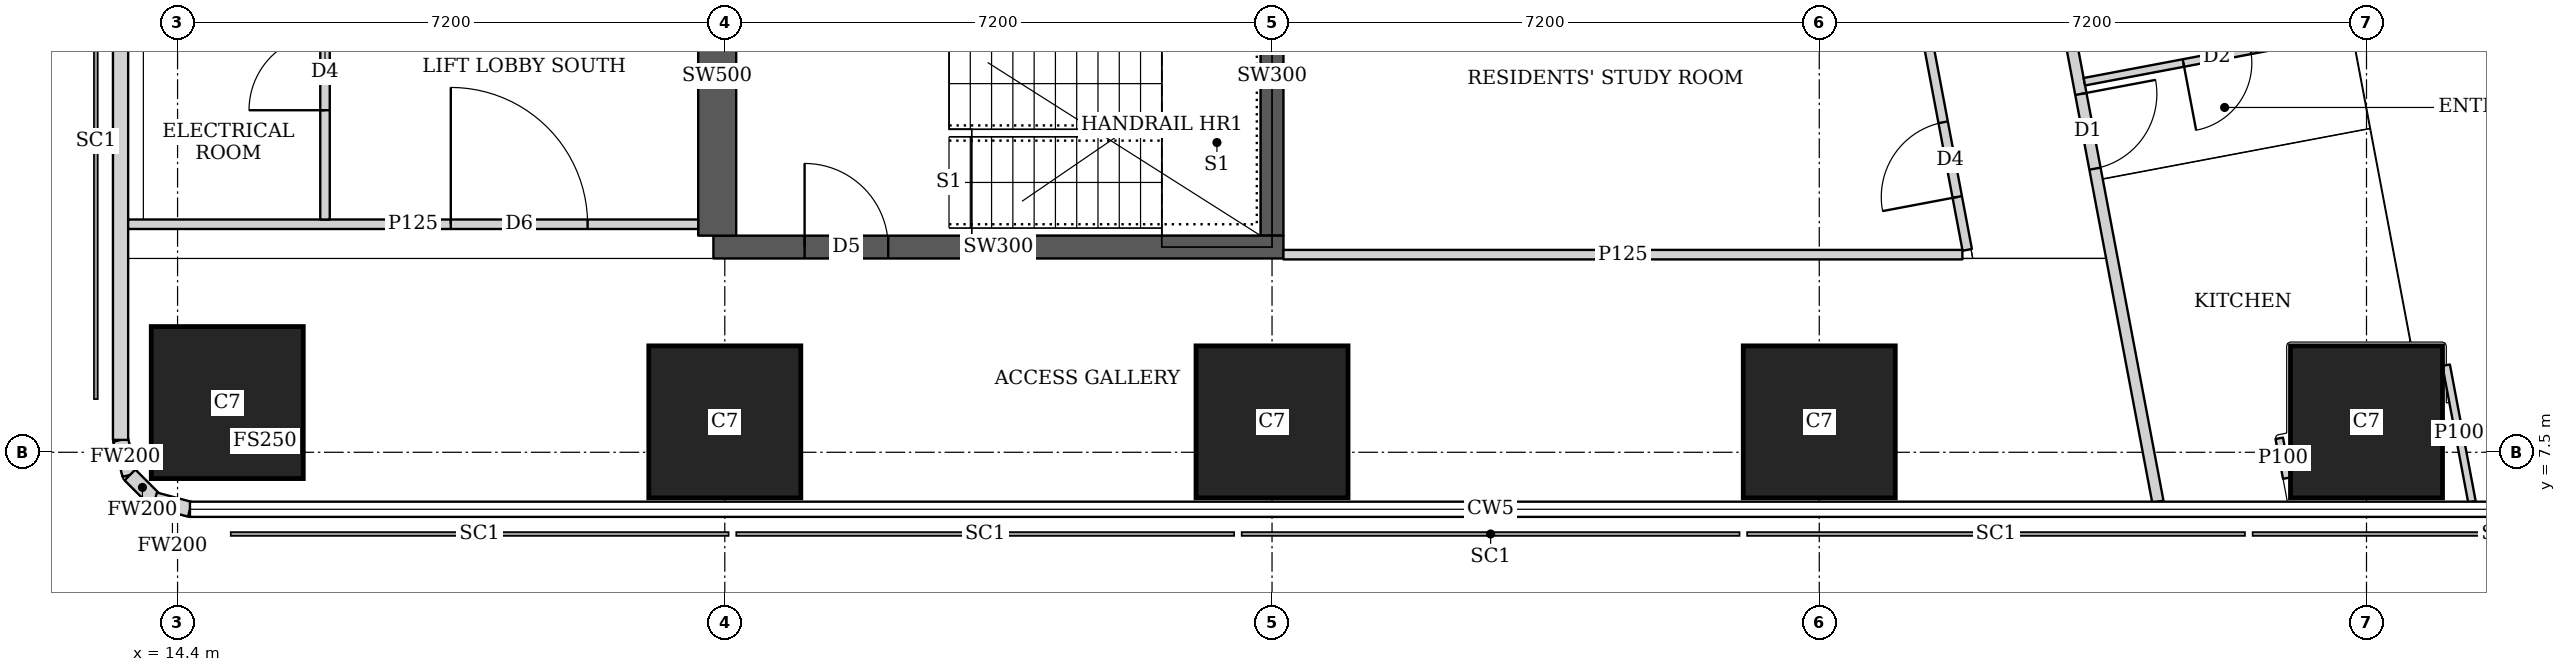
"""IFC4 building model, lengths in metres.
Left out: names, types, materials, properties, quantities, classifications, styles, units other than length and angle.
Written with IfcOpenShell. Run it as: python <this file> out.ifc"""

import sys

from ifc_helpers import new_model, si_unit, direction, frame, frame_2d, origin, origin_2d, place, context, subcontext, project, spatial, rectangle, extrude, element, fill, save


model = new_model("IFC4")
c1 = context("Model", 3, precision=1e-05, world=origin(), true_north=direction((0.0, 1.0)))
c2 = subcontext(c1, "Body", "Model", "MODEL_VIEW")
j1 = project(units=[si_unit("LENGTHUNIT", "METRE"), si_unit("PLANEANGLEUNIT", "RADIAN")], contexts=[c1])
p1 = place(None, origin())
s1 = spatial("IfcSite", under=j1, at=p1, CompositionType="ELEMENT")
p2 = place(p1, origin())
s2 = spatial("IfcBuilding", under=s1, at=p2, CompositionType="ELEMENT")
p3 = place(p2, frame((0.0, 0.0, 277.85)))
s3 = spatial("IfcBuildingStorey", under=s2, at=p3, CompositionType="ELEMENT", Elevation=277.85)
for number, where, z_axis, x_axis in (
    (1, (15.054, 8.154, 0.0), (0.0, 0.0, 1.0), (1.0, 0.0, 0.0)),
    (2, (21.6, 7.9, 0.0), (0.0, 0.0, 1.0), (1.0, 0.0, 0.0)),
    (3, (28.8, 7.9, 0.0), (0.0, 0.0, 1.0), (1.0, 0.0, 0.0)),
    (4, (36.0, 7.9, 0.0), (0.0, 0.0, 1.0), (1.0, 0.0, 0.0)),
    (5, (43.2, 7.9, 0.0), (0.0, 0.0, 1.0), (1.0, 0.0, 0.0)),
):
    element("IfcColumn", number, at=place(p3, frame(where, z_axis=z_axis, x_axis=x_axis)), inside=s3, PredefinedType="COLUMN", context=c2, shape_type="SweptSolid", body=[
        extrude(rectangle(XDim=2.0, YDim=2.0, at=origin_2d()), origin(), (0.0, 0.0, 1.0), 3.75),
    ])
p4 = place(p3, frame((21.45, 10.2, 0.0), z_axis=(0.0, 0.0, 1.0), x_axis=(1.0, 0.0, 0.0)))
e6 = element("IfcWall", 6, at=p4, inside=s3, PredefinedType="SHEAR", context=c2, shape_type="SweptSolid", body=[
    extrude(rectangle(XDim=7.5, YDim=0.3, at=frame_2d((3.75, 0.0))), origin(), (0.0, 0.0, 1.0), 3.75),
])
p5 = place(p4, frame((1.2, 0.0, 0.0)))
e7 = element("IfcOpeningElement", 7, at=p5, cuts=e6, PredefinedType="OPENING", context=c2, shape_type="SweptSolid", body=[
    extrude(rectangle(XDim=1.1, YDim=2.1, at=frame_2d((0.55, 1.05))), frame((0.0, 0.16, 0.0), z_axis=(0.0, -1.0, 0.0), x_axis=(1.0, 0.0, 0.0)), (0.0, 0.0, 1.0), 0.32),
])
p6 = place(p3, frame((21.5, 10.35, 0.0), z_axis=(0.0, 0.0, 1.0), x_axis=(0.0, 1.0, 0.0)))
e8 = element("IfcWall", 8, at=p6, inside=s3, PredefinedType="SHEAR", context=c2, shape_type="SweptSolid", body=[
    extrude(rectangle(XDim=4.2, YDim=0.5, at=frame_2d((2.1, 0.0))), origin(), (0.0, 0.0, 1.0), 3.75),
])
p7 = place(p3, frame((28.8, 10.35, 0.0), z_axis=(0.0, 0.0, 1.0), x_axis=(0.0, 1.0, 0.0)))
e9 = element("IfcWall", 9, at=p7, inside=s3, PredefinedType="SHEAR", context=c2, shape_type="SweptSolid", body=[
    extrude(rectangle(XDim=4.2, YDim=0.3, at=frame_2d((2.1, 0.0))), origin(), (0.0, 0.0, 1.0), 3.75),
])
p8 = place(p3, frame((49.684, 7.832, 0.0), z_axis=(0.0, 0.0, 1.0), x_axis=(-0.185616669694, 0.982622232565, 0.0)))
e10 = element("IfcWall", 10, at=p8, inside=s3, PredefinedType="SOLIDWALL", context=c2, shape_type="SweptSolid", body=[
    extrude(rectangle(XDim=36.0, YDim=0.2, at=frame_2d((18.0, 0.0))), origin(), (0.0, 0.0, 1.0), 3.5),
])
p9 = place(p8, frame((2.518, 0.0, 0.9)))
e11 = element("IfcOpeningElement", 11, at=p9, cuts=e10, PredefinedType="OPENING", context=c2, shape_type="SweptSolid", body=[
    extrude(rectangle(XDim=2.4, YDim=1.5, at=frame_2d((1.2, 0.75))), frame((0.0, 0.11, 0.0), z_axis=(0.0, -1.0, 0.0), x_axis=(1.0, 0.0, 0.0)), (0.0, 0.0, 1.0), 0.22),
])
p10 = place(p8, frame((8.444, 0.0, 0.9)))
e12 = element("IfcOpeningElement", 12, at=p10, cuts=e10, PredefinedType="OPENING", context=c2, shape_type="SweptSolid", body=[
    extrude(rectangle(XDim=1.8, YDim=1.5, at=frame_2d((0.9, 0.75))), frame((0.0, 0.11, 0.0), z_axis=(0.0, -1.0, 0.0), x_axis=(1.0, 0.0, 0.0)), (0.0, 0.0, 1.0), 0.22),
])
p11 = place(p8, frame((12.261, 0.0, 0.9)))
e13 = element("IfcOpeningElement", 13, at=p11, cuts=e10, PredefinedType="OPENING", context=c2, shape_type="SweptSolid", body=[
    extrude(rectangle(XDim=1.8, YDim=1.5, at=frame_2d((0.9, 0.75))), frame((0.0, 0.11, 0.0), z_axis=(0.0, -1.0, 0.0), x_axis=(1.0, 0.0, 0.0)), (0.0, 0.0, 1.0), 0.22),
])
p12 = place(p8, frame((16.078, 0.0, 0.9)))
e14 = element("IfcOpeningElement", 14, at=p12, cuts=e10, PredefinedType="OPENING", context=c2, shape_type="SweptSolid", body=[
    extrude(rectangle(XDim=1.8, YDim=1.5, at=frame_2d((0.9, 0.75))), frame((0.0, 0.11, 0.0), z_axis=(0.0, -1.0, 0.0), x_axis=(1.0, 0.0, 0.0)), (0.0, 0.0, 1.0), 0.22),
])
p13 = place(p8, frame((19.894, 0.0, 0.9)))
e15 = element("IfcOpeningElement", 15, at=p13, cuts=e10, PredefinedType="OPENING", context=c2, shape_type="SweptSolid", body=[
    extrude(rectangle(XDim=1.8, YDim=1.5, at=frame_2d((0.9, 0.75))), frame((0.0, 0.11, 0.0), z_axis=(0.0, -1.0, 0.0), x_axis=(1.0, 0.0, 0.0)), (0.0, 0.0, 1.0), 0.22),
])
p14 = place(p8, frame((23.71, 0.0, 0.9)))
e16 = element("IfcOpeningElement", 16, at=p14, cuts=e10, PredefinedType="OPENING", context=c2, shape_type="SweptSolid", body=[
    extrude(rectangle(XDim=1.8, YDim=1.5, at=frame_2d((0.9, 0.75))), frame((0.0, 0.11, 0.0), z_axis=(0.0, -1.0, 0.0), x_axis=(1.0, 0.0, 0.0)), (0.0, 0.0, 1.0), 0.22),
])
p15 = place(p8, frame((27.526, 0.0, 0.9)))
e17 = element("IfcOpeningElement", 17, at=p15, cuts=e10, PredefinedType="OPENING", context=c2, shape_type="SweptSolid", body=[
    extrude(rectangle(XDim=1.8, YDim=1.5, at=frame_2d((0.9, 0.75))), frame((0.0, 0.11, 0.0), z_axis=(0.0, -1.0, 0.0), x_axis=(1.0, 0.0, 0.0)), (0.0, 0.0, 1.0), 0.22),
])
p16 = place(p8, frame((32.046, 0.0, 0.9)))
e18 = element("IfcOpeningElement", 18, at=p16, cuts=e10, PredefinedType="OPENING", context=c2, shape_type="SweptSolid", body=[
    extrude(rectangle(XDim=1.8, YDim=1.5, at=frame_2d((0.9, 0.75))), frame((0.0, 0.11, 0.0), z_axis=(0.0, -1.0, 0.0), x_axis=(1.0, 0.0, 0.0)), (0.0, 0.0, 1.0), 0.22),
])
p17 = place(p3, frame((13.65, 43.037, 0.0), z_axis=(0.0, 0.0, 1.0), x_axis=(0.0, -1.0, 0.0)))
e19 = element("IfcWall", 19, at=p17, inside=s3, PredefinedType="SOLIDWALL", context=c2, shape_type="SweptSolid", body=[
    extrude(rectangle(XDim=35.374, YDim=0.2, at=frame_2d((17.687, 0.0))), origin(), (0.0, 0.0, 1.0), 3.5),
])
p18 = place(p17, frame((1.959, 0.0, 0.9)))
e20 = element("IfcOpeningElement", 20, at=p18, cuts=e19, PredefinedType="OPENING", context=c2, shape_type="SweptSolid", body=[
    extrude(rectangle(XDim=1.8, YDim=1.5, at=frame_2d((0.9, 0.75))), frame((0.0, 0.11, 0.0), z_axis=(0.0, -1.0, 0.0), x_axis=(1.0, 0.0, 0.0)), (0.0, 0.0, 1.0), 0.22),
])
p19 = place(p3, frame((13.65, 7.663, 0.0), z_axis=(0.0, 0.0, 1.0), x_axis=(0.259698463175, -0.965689757751, 0.0)))
e21 = element("IfcWall", 21, at=p19, inside=s3, PredefinedType="SOLIDWALL", context=c2, shape_type="SweptSolid", body=[
    extrude(rectangle(XDim=0.478, YDim=0.2, at=frame_2d((0.239, 0.0))), origin(), (0.0, 0.0, 1.0), 3.5),
])
p20 = place(p3, frame((13.774, 7.202, 0.0), z_axis=(0.0, 0.0, 1.0), x_axis=(0.707369890659, -0.706843573776, 0.0)))
e22 = element("IfcWall", 22, at=p20, inside=s3, PredefinedType="SOLIDWALL", context=c2, shape_type="SweptSolid", body=[
    extrude(rectangle(XDim=0.464, YDim=0.2, at=frame_2d((0.232, 0.0))), origin(), (0.0, 0.0, 1.0), 3.5),
])
p21 = place(p3, frame((14.102, 6.874, 0.0), z_axis=(0.0, 0.0, 1.0), x_axis=(0.965655254015, -0.259826731483, 0.0)))
e23 = element("IfcWall", 23, at=p21, inside=s3, PredefinedType="SOLIDWALL", context=c2, shape_type="SweptSolid", body=[
    extrude(rectangle(XDim=0.477, YDim=0.2, at=frame_2d((0.239, 0.0))), origin(), (0.0, 0.0, 1.0), 3.5),
])
p22 = place(p3, frame((33.781, 42.186, 0.0), z_axis=(0.0, 0.0, 1.0), x_axis=(0.185593518645, -0.9826266055, 0.0)))
e24 = element("IfcWall", 24, at=p22, inside=s3, PredefinedType="SOLIDWALL", context=c2, shape_type="SweptSolid", body=[
    extrude(rectangle(XDim=35.961, YDim=0.15, at=frame_2d((17.98, 0.0))), origin(), (0.0, 0.0, 1.0), 2.5),
])
p23 = place(p22, frame((11.76, 0.0, 0.0)))
e25 = element("IfcOpeningElement", 25, at=p23, cuts=e24, PredefinedType="OPENING", context=c2, shape_type="SweptSolid", body=[
    extrude(rectangle(XDim=1.0, YDim=2.1, at=frame_2d((0.5, 1.05))), frame((0.0, 0.085, 0.0), z_axis=(0.0, -1.0, 0.0), x_axis=(1.0, 0.0, 0.0)), (0.0, 0.0, 1.0), 0.17),
])
p24 = place(p22, frame((15.576, 0.0, 0.0)))
e26 = element("IfcOpeningElement", 26, at=p24, cuts=e24, PredefinedType="OPENING", context=c2, shape_type="SweptSolid", body=[
    extrude(rectangle(XDim=1.0, YDim=2.1, at=frame_2d((0.5, 1.05))), frame((0.0, 0.085, 0.0), z_axis=(0.0, -1.0, 0.0), x_axis=(1.0, 0.0, 0.0)), (0.0, 0.0, 1.0), 0.17),
])
p25 = place(p22, frame((30.502, 0.0, 0.0)))
e27 = element("IfcOpeningElement", 27, at=p25, cuts=e24, PredefinedType="OPENING", context=c2, shape_type="SweptSolid", body=[
    extrude(rectangle(XDim=1.0, YDim=2.1, at=frame_2d((0.5, 1.05))), frame((0.0, 0.085, 0.0), z_axis=(0.0, -1.0, 0.0), x_axis=(1.0, 0.0, 0.0)), (0.0, 0.0, 1.0), 0.17),
])
p26 = place(p3, frame((44.248, 8.646, 0.0), z_axis=(0.0, 0.0, 1.0), x_axis=(0.185417594585, -0.982659816833, 0.0)))
e28 = element("IfcWall", 28, at=p26, inside=s3, PredefinedType="PARTITIONING", context=c2, shape_type="SweptSolid", body=[
    extrude(rectangle(XDim=1.828, YDim=0.1, at=frame_2d((0.914, 0.0))), origin(), (0.0, 0.0, 1.0), 2.05),
])
p27 = place(p3, frame((42.151, 7.16, 0.0), z_axis=(0.0, 0.0, 1.0), x_axis=(-0.185366164644, 0.982669519729, 0.0)))
e29 = element("IfcWall", 29, at=p27, inside=s3, PredefinedType="PARTITIONING", context=c2, shape_type="SweptSolid", body=[
    extrude(rectangle(XDim=0.533, YDim=0.1, at=frame_2d((0.267, 0.0))), origin(), (0.0, 0.0, 1.0), 2.5),
])
p28 = place(p3, frame((42.952, 13.03, 0.0), z_axis=(0.0, 0.0, 1.0), x_axis=(-0.982585626838, -0.185810349366, 0.0)))
e30 = element("IfcWall", 30, at=p28, inside=s3, PredefinedType="PARTITIONING", context=c2, shape_type="SweptSolid", body=[
    extrude(rectangle(XDim=3.525, YDim=0.1, at=frame_2d((1.763, 0.0))), origin(), (0.0, 0.0, 1.0), 3.5),
])
p29 = place(p28, frame((1.299, 0.0, 0.0)))
e31 = element("IfcOpeningElement", 31, at=p29, cuts=e30, PredefinedType="OPENING", context=c2, shape_type="SweptSolid", body=[
    extrude(rectangle(XDim=0.9, YDim=2.1, at=frame_2d((0.45, 1.05))), frame((0.0, 0.06, 0.0), z_axis=(0.0, -1.0, 0.0), x_axis=(1.0, 0.0, 0.0)), (0.0, 0.0, 1.0), 0.12),
])
p30 = place(p3, frame((13.75, 10.5, 0.0), z_axis=(0.0, 0.0, 1.0), x_axis=(1.0, 0.0, 0.0)))
e32 = element("IfcWall", 32, at=p30, inside=s3, PredefinedType="PARTITIONING", context=c2, shape_type="SweptSolid", body=[
    extrude(rectangle(XDim=7.5, YDim=0.125, at=frame_2d((3.75, 0.0))), origin(), (0.0, 0.0, 1.0), 3.5),
])
p31 = place(p30, frame((4.245, 0.0, 0.0)))
e33 = element("IfcOpeningElement", 33, at=p31, cuts=e32, PredefinedType="OPENING", context=c2, shape_type="SweptSolid", body=[
    extrude(rectangle(XDim=1.8, YDim=2.1, at=frame_2d((0.9, 1.05))), frame((0.0, 0.073, 0.0), z_axis=(0.0, -1.0, 0.0), x_axis=(1.0, 0.0, 0.0)), (0.0, 0.0, 1.0), 0.145),
])
p32 = place(p3, frame((16.34, 10.562, 0.0), z_axis=(0.0, 0.0, 1.0), x_axis=(0.0, 1.0, 0.0)))
e34 = element("IfcWall", 34, at=p32, inside=s3, PredefinedType="PARTITIONING", context=c2, shape_type="SweptSolid", body=[
    extrude(rectangle(XDim=3.988, YDim=0.125, at=frame_2d((1.994, 0.0))), origin(), (0.0, 0.0, 1.0), 3.5),
])
p33 = place(p32, frame((1.438, 0.0, 0.0)))
e35 = element("IfcOpeningElement", 35, at=p33, cuts=e34, PredefinedType="OPENING", context=c2, shape_type="SweptSolid", body=[
    extrude(rectangle(XDim=1.0, YDim=2.1, at=frame_2d((0.5, 1.05))), frame((0.0, 0.073, 0.0), z_axis=(0.0, -1.0, 0.0), x_axis=(1.0, 0.0, 0.0)), (0.0, 0.0, 1.0), 0.145),
])
p34 = place(p3, frame((28.95, 10.1, 0.0), z_axis=(0.0, 0.0, 1.0), x_axis=(1.0, 0.0, 0.0)))
e36 = element("IfcWall", 36, at=p34, inside=s3, PredefinedType="PARTITIONING", context=c2, shape_type="SweptSolid", body=[
    extrude(rectangle(XDim=8.933, YDim=0.125, at=frame_2d((4.467, 0.0))), origin(), (0.0, 0.0, 1.0), 3.5),
])
p35 = place(p3, frame((37.947, 10.163, 0.0), z_axis=(0.0, 0.0, 1.0), x_axis=(-0.185572770922, 0.982630523998, 0.0)))
e37 = element("IfcWall", 37, at=p35, inside=s3, PredefinedType="PARTITIONING", context=c2, shape_type="SweptSolid", body=[
    extrude(rectangle(XDim=25.111, YDim=0.125, at=frame_2d((12.556, 0.0))), origin(), (0.0, 0.0, 1.0), 2.5),
])
p36 = place(p35, frame((0.708, 0.0, 0.0)))
e38 = element("IfcOpeningElement", 38, at=p36, cuts=e37, PredefinedType="OPENING", context=c2, shape_type="SweptSolid", body=[
    extrude(rectangle(XDim=1.0, YDim=2.1, at=frame_2d((0.5, 1.05))), frame((0.0, 0.073, 0.0), z_axis=(0.0, -1.0, 0.0), x_axis=(1.0, 0.0, 0.0)), (0.0, 0.0, 1.0), 0.145),
])
p37 = place(p35, frame((5.9, 0.0, 0.0)))
e39 = element("IfcOpeningElement", 39, at=p37, cuts=e37, PredefinedType="OPENING", context=c2, shape_type="SweptSolid", body=[
    extrude(rectangle(XDim=1.0, YDim=2.1, at=frame_2d((0.5, 1.05))), frame((0.0, 0.073, 0.0), z_axis=(0.0, -1.0, 0.0), x_axis=(1.0, 0.0, 0.0)), (0.0, 0.0, 1.0), 0.145),
])
p38 = place(p35, frame((13.378, 0.0, 0.0)))
e40 = element("IfcOpeningElement", 40, at=p38, cuts=e37, PredefinedType="OPENING", context=c2, shape_type="SweptSolid", body=[
    extrude(rectangle(XDim=1.0, YDim=2.1, at=frame_2d((0.5, 1.05))), frame((0.0, 0.073, 0.0), z_axis=(0.0, -1.0, 0.0), x_axis=(1.0, 0.0, 0.0)), (0.0, 0.0, 1.0), 0.145),
])
p39 = place(p35, frame((21.15, 0.0, 0.0)))
e41 = element("IfcOpeningElement", 41, at=p39, cuts=e37, PredefinedType="OPENING", context=c2, shape_type="SweptSolid", body=[
    extrude(rectangle(XDim=1.0, YDim=2.1, at=frame_2d((0.5, 1.05))), frame((0.0, 0.073, 0.0), z_axis=(0.0, -1.0, 0.0), x_axis=(1.0, 0.0, 0.0)), (0.0, 0.0, 1.0), 0.145),
])
p40 = place(p29, origin())
e42 = element("IfcDoor", 42, at=p40, inside=s3, OperationType="SINGLE_SWING_RIGHT", PredefinedType="DOOR", context=c2, shape_type="SweptSolid", body=[
    extrude(rectangle(XDim=0.9, YDim=2.1, at=frame_2d((0.45, 1.05))), frame((0.0, 0.025, 0.0), z_axis=(0.0, -1.0, 0.0), x_axis=(1.0, 0.0, 0.0)), (0.0, 0.0, 1.0), 0.05),
])
fill(e31, e42)
p41 = place(p25, origin())
e43 = element("IfcDoor", 43, at=p41, inside=s3, OperationType="SINGLE_SWING_LEFT", PredefinedType="DOOR", context=c2, shape_type="SweptSolid", body=[
    extrude(rectangle(XDim=1.0, YDim=2.1, at=frame_2d((0.5, 1.05))), frame((0.0, 0.025, 0.0), z_axis=(0.0, -1.0, 0.0), x_axis=(1.0, 0.0, 0.0)), (0.0, 0.0, 1.0), 0.05),
])
fill(e27, e43)
p42 = place(p33, origin())
e44 = element("IfcDoor", 44, at=p42, inside=s3, OperationType="SINGLE_SWING_LEFT", PredefinedType="DOOR", context=c2, shape_type="SweptSolid", body=[
    extrude(rectangle(XDim=1.0, YDim=2.1, at=frame_2d((0.5, 1.05))), frame((0.0, 0.025, 0.0), z_axis=(0.0, -1.0, 0.0), x_axis=(1.0, 0.0, 0.0)), (0.0, 0.0, 1.0), 0.05),
])
fill(e35, e44)
p43 = place(p31, origin())
e45 = element("IfcDoor", 45, at=p43, inside=s3, OperationType="DOUBLE_DOOR_SINGLE_SWING", PredefinedType="DOOR", context=c2, shape_type="SweptSolid", body=[
    extrude(rectangle(XDim=1.8, YDim=2.1, at=frame_2d((0.9, 1.05))), frame((0.0, 0.025, 0.0), z_axis=(0.0, -1.0, 0.0), x_axis=(1.0, 0.0, 0.0)), (0.0, 0.0, 1.0), 0.05),
])
fill(e33, e45)
p44 = place(p36, origin())
e46 = element("IfcDoor", 46, at=p44, inside=s3, OperationType="SINGLE_SWING_LEFT", PredefinedType="DOOR", context=c2, shape_type="SweptSolid", body=[
    extrude(rectangle(XDim=1.0, YDim=2.1, at=frame_2d((0.5, 1.05))), frame((0.0, 0.025, 0.0), z_axis=(0.0, -1.0, 0.0), x_axis=(1.0, 0.0, 0.0)), (0.0, 0.0, 1.0), 0.05),
])
fill(e38, e46)
p45 = place(p5, origin())
e47 = element("IfcDoor", 47, at=p45, inside=s3, OperationType="SINGLE_SWING_LEFT", PredefinedType="DOOR", context=c2, shape_type="SweptSolid", body=[
    extrude(rectangle(XDim=1.1, YDim=2.1, at=frame_2d((0.55, 1.05))), frame((0.0, 0.025, 0.0), z_axis=(0.0, -1.0, 0.0), x_axis=(1.0, 0.0, 0.0)), (0.0, 0.0, 1.0), 0.05),
])
fill(e7, e47)
save(model, sys.argv[1])
